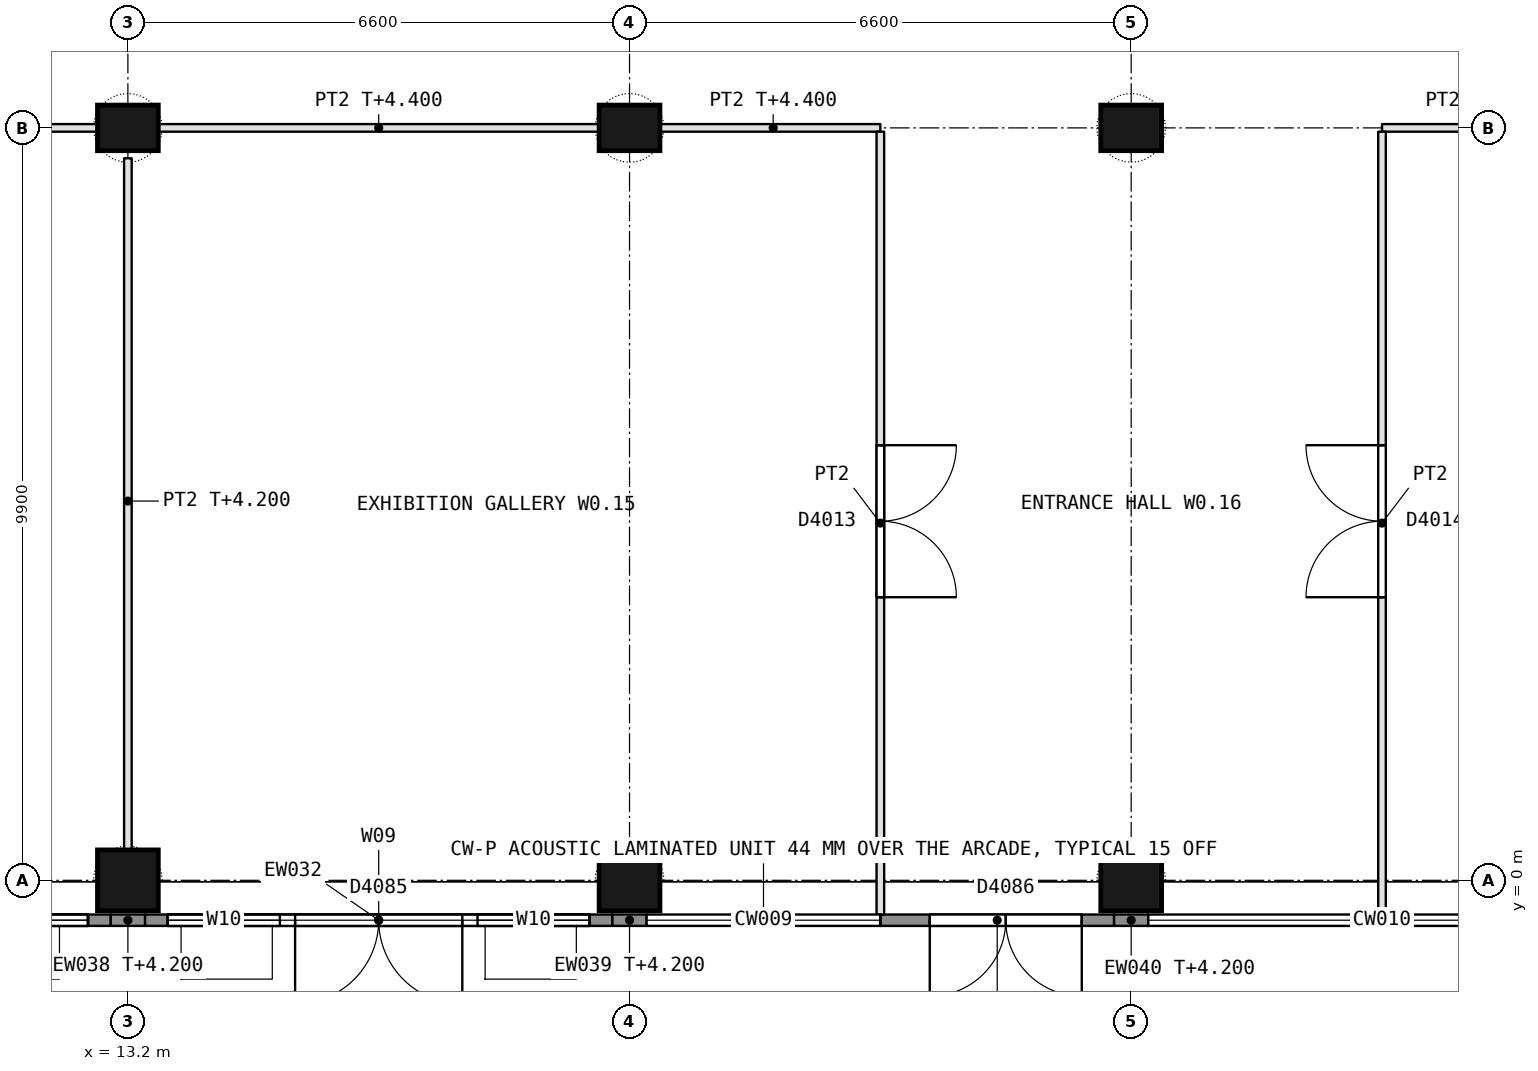
"""IFC4 building model, lengths in metres.
Left out: names, types, materials, properties, quantities, classifications, styles, units other than length and angle.
Written with IfcOpenShell. Run it as: python <this file> out.ifc"""

import sys

from ifc_helpers import new_model, si_unit, direction, frame, frame_2d, origin, origin_2d, place, context, subcontext, project, spatial, rectangle, extrude, element, fill, save


model = new_model("IFC4")
c1 = context("Model", 3, precision=1e-05, world=origin(), true_north=direction((0.0, 1.0)))
c2 = subcontext(c1, "Body", "Model", "MODEL_VIEW")
j1 = project(units=[si_unit("LENGTHUNIT", "METRE"), si_unit("PLANEANGLEUNIT", "RADIAN")], contexts=[c1])
p1 = place(None, origin())
s1 = spatial("IfcSite", under=j1, at=p1, CompositionType="ELEMENT")
p2 = place(p1, origin())
s2 = spatial("IfcBuilding", under=s1, at=p2, CompositionType="ELEMENT")
p3 = place(p2, origin())
s3 = spatial("IfcBuildingStorey", under=s2, at=p3, CompositionType="ELEMENT", Elevation=0.0)
p4 = place(p3, frame((13.2, 0.0, 0.0), z_axis=(0.0, 0.0, 1.0), x_axis=(1.0, 0.0, 0.0)))
e1 = element("IfcColumn", 1, at=p4, inside=s3, PredefinedType="COLUMN", context=c2, shape_type="SweptSolid", body=[
    extrude(rectangle(XDim=0.8, YDim=0.8, at=origin_2d()), origin(), (0.0, 0.0, 1.0), 5.4),
])
p5 = place(p3, frame((13.2, 9.9, 0.0), z_axis=(0.0, 0.0, 1.0), x_axis=(1.0, 0.0, 0.0)))
e2 = element("IfcColumn", 2, at=p5, inside=s3, PredefinedType="COLUMN", context=c2, shape_type="SweptSolid", body=[
    extrude(rectangle(XDim=0.8, YDim=0.6, at=origin_2d()), origin(), (0.0, 0.0, 1.0), 5.4),
])
p6 = place(p3, frame((19.8, 0.0, 0.0), z_axis=(0.0, 0.0, 1.0), x_axis=(1.0, 0.0, 0.0)))
e3 = element("IfcColumn", 3, at=p6, inside=s3, PredefinedType="COLUMN", context=c2, shape_type="SweptSolid", body=[
    extrude(rectangle(XDim=0.8, YDim=0.8, at=origin_2d()), origin(), (0.0, 0.0, 1.0), 5.4),
])
p7 = place(p3, frame((19.8, 9.9, 0.0), z_axis=(0.0, 0.0, 1.0), x_axis=(1.0, 0.0, 0.0)))
e4 = element("IfcColumn", 4, at=p7, inside=s3, PredefinedType="COLUMN", context=c2, shape_type="SweptSolid", body=[
    extrude(rectangle(XDim=0.8, YDim=0.6, at=origin_2d()), origin(), (0.0, 0.0, 1.0), 5.4),
])
p8 = place(p3, frame((26.4, 0.0, 0.0), z_axis=(0.0, 0.0, 1.0), x_axis=(1.0, 0.0, 0.0)))
e5 = element("IfcColumn", 5, at=p8, inside=s3, PredefinedType="COLUMN", context=c2, shape_type="SweptSolid", body=[
    extrude(rectangle(XDim=0.8, YDim=0.8, at=origin_2d()), origin(), (0.0, 0.0, 1.0), 5.4),
])
p9 = place(p3, frame((26.4, 9.9, 0.0), z_axis=(0.0, 0.0, 1.0), x_axis=(1.0, 0.0, 0.0)))
e6 = element("IfcColumn", 6, at=p9, inside=s3, PredefinedType="COLUMN", context=c2, shape_type="SweptSolid", body=[
    extrude(rectangle(XDim=0.8, YDim=0.6, at=origin_2d()), origin(), (0.0, 0.0, 1.0), 5.4),
])
p10 = place(p3, frame((12.975, -0.525, 0.0), z_axis=(0.0, 0.0, 1.0), x_axis=(-1.0, 0.0, 0.0)))
e7 = element("IfcWall", 7, at=p10, inside=s3, PredefinedType="STANDARD", context=c2, shape_type="SweptSolid", body=[
    extrude(rectangle(XDim=6.15, YDim=0.15, at=frame_2d((3.075, 0.0))), origin(), (0.0, 0.0, 1.0), 5.1),
])
p11 = place(p10, frame((2.175, 0.0, 0.0)))
e8 = element("IfcOpeningElement", 8, at=p11, cuts=e7, PredefinedType="OPENING", context=c2, shape_type="SweptSolid", body=[
    extrude(rectangle(XDim=1.8, YDim=2.4, at=frame_2d((0.9, 1.2))), frame((0.0, 0.085, 0.0), z_axis=(0.0, -1.0, 0.0), x_axis=(1.0, 0.0, 0.0)), (0.0, 0.0, 1.0), 0.17),
])
p12 = place(p10, frame((4.175, 0.0, 0.1)))
e9 = element("IfcOpeningElement", 9, at=p12, cuts=e7, PredefinedType="OPENING", context=c2, shape_type="SweptSolid", body=[
    extrude(rectangle(XDim=1.675, YDim=2.3, at=frame_2d((0.837, 1.15))), frame((0.0, 0.085, 0.0), z_axis=(0.0, -1.0, 0.0), x_axis=(1.0, 0.0, 0.0)), (0.0, 0.0, 1.0), 0.17),
])
p13 = place(p10, frame((0.3, 0.0, 0.1)))
e10 = element("IfcOpeningElement", 10, at=p13, cuts=e7, PredefinedType="OPENING", context=c2, shape_type="SweptSolid", body=[
    extrude(rectangle(XDim=1.675, YDim=2.3, at=frame_2d((0.837, 1.15))), frame((0.0, 0.085, 0.0), z_axis=(0.0, -1.0, 0.0), x_axis=(1.0, 0.0, 0.0)), (0.0, 0.0, 1.0), 0.17),
])
p14 = place(p10, frame((0.3, 0.0, 2.55)))
e11 = element("IfcOpeningElement", 11, at=p14, cuts=e7, PredefinedType="OPENING", context=c2, shape_type="SweptSolid", body=[
    extrude(rectangle(XDim=5.55, YDim=2.4, at=frame_2d((2.775, 1.2))), frame((0.0, 0.085, 0.0), z_axis=(0.0, -1.0, 0.0), x_axis=(1.0, 0.0, 0.0)), (0.0, 0.0, 1.0), 0.17),
])
p15 = place(p3, frame((19.575, -0.525, 0.0), z_axis=(0.0, 0.0, 1.0), x_axis=(-1.0, 0.0, 0.0)))
e12 = element("IfcWall", 12, at=p15, inside=s3, PredefinedType="STANDARD", context=c2, shape_type="SweptSolid", body=[
    extrude(rectangle(XDim=6.15, YDim=0.15, at=frame_2d((3.075, 0.0))), origin(), (0.0, 0.0, 1.0), 5.1),
])
p16 = place(p15, frame((1.975, 0.0, 0.0)))
e13 = element("IfcOpeningElement", 13, at=p16, cuts=e12, PredefinedType="OPENING", context=c2, shape_type="SweptSolid", body=[
    extrude(rectangle(XDim=2.2, YDim=2.4, at=frame_2d((1.1, 1.2))), frame((0.0, 0.085, 0.0), z_axis=(0.0, -1.0, 0.0), x_axis=(1.0, 0.0, 0.0)), (0.0, 0.0, 1.0), 0.17),
])
p17 = place(p15, frame((4.375, 0.0, 0.1)))
e14 = element("IfcOpeningElement", 14, at=p17, cuts=e12, PredefinedType="OPENING", context=c2, shape_type="SweptSolid", body=[
    extrude(rectangle(XDim=1.475, YDim=2.3, at=frame_2d((0.738, 1.15))), frame((0.0, 0.085, 0.0), z_axis=(0.0, -1.0, 0.0), x_axis=(1.0, 0.0, 0.0)), (0.0, 0.0, 1.0), 0.17),
])
p18 = place(p15, frame((0.3, 0.0, 0.1)))
e15 = element("IfcOpeningElement", 15, at=p18, cuts=e12, PredefinedType="OPENING", context=c2, shape_type="SweptSolid", body=[
    extrude(rectangle(XDim=1.475, YDim=2.3, at=frame_2d((0.738, 1.15))), frame((0.0, 0.085, 0.0), z_axis=(0.0, -1.0, 0.0), x_axis=(1.0, 0.0, 0.0)), (0.0, 0.0, 1.0), 0.17),
])
p19 = place(p15, frame((0.3, 0.0, 2.55)))
e16 = element("IfcOpeningElement", 16, at=p19, cuts=e12, PredefinedType="OPENING", context=c2, shape_type="SweptSolid", body=[
    extrude(rectangle(XDim=5.55, YDim=2.4, at=frame_2d((2.775, 1.2))), frame((0.0, 0.085, 0.0), z_axis=(0.0, -1.0, 0.0), x_axis=(1.0, 0.0, 0.0)), (0.0, 0.0, 1.0), 0.17),
])
p20 = place(p3, frame((26.175, -0.525, 0.0), z_axis=(0.0, 0.0, 1.0), x_axis=(-1.0, 0.0, 0.0)))
e17 = element("IfcWall", 17, at=p20, inside=s3, PredefinedType="STANDARD", context=c2, shape_type="SweptSolid", body=[
    extrude(rectangle(XDim=3.075, YDim=0.15, at=frame_2d((1.538, 0.0))), origin(), (0.0, 0.0, 1.0), 5.1),
])
p21 = place(p20, frame((0.425, 0.0, 0.0)))
e18 = element("IfcOpeningElement", 18, at=p21, cuts=e17, PredefinedType="OPENING", context=c2, shape_type="SweptSolid", body=[
    extrude(rectangle(XDim=2.0, YDim=2.4, at=frame_2d((1.0, 1.2))), frame((0.0, 0.085, 0.0), z_axis=(0.0, -1.0, 0.0), x_axis=(1.0, 0.0, 0.0)), (0.0, 0.0, 1.0), 0.17),
])
for number, where, z_axis, x_axis in (
    (19, (13.425, -0.525, 0.0), (0.0, 0.0, 1.0), (-1.0, 0.0, 0.0)),
    (20, (20.025, -0.525, 0.0), (0.0, 0.0, 1.0), (-1.0, 0.0, 0.0)),
    (21, (26.625, -0.525, 0.0), (0.0, 0.0, 1.0), (-1.0, 0.0, 0.0)),
):
    element("IfcWall", number, at=place(p3, frame(where, z_axis=z_axis, x_axis=x_axis)), inside=s3, PredefinedType="STANDARD", context=c2, shape_type="SweptSolid", body=[
        extrude(rectangle(XDim=0.45, YDim=0.15, at=frame_2d((0.225, 0.0))), origin(), (0.0, 0.0, 1.0), 4.2),
    ])
p22 = place(p3, frame((7.0, 9.9, 0.0), z_axis=(0.0, 0.0, 1.0), x_axis=(1.0, 0.0, 0.0)))
e22 = element("IfcWall", 22, at=p22, inside=s3, PredefinedType="PARTITIONING", context=c2, shape_type="SweptSolid", body=[
    extrude(rectangle(XDim=5.8, YDim=0.1, at=frame_2d((2.9, 0.0))), origin(), (0.0, 0.0, 1.0), 4.4),
])
p23 = place(p3, frame((13.6, 9.9, 0.0), z_axis=(0.0, 0.0, 1.0), x_axis=(1.0, 0.0, 0.0)))
e23 = element("IfcWall", 23, at=p23, inside=s3, PredefinedType="PARTITIONING", context=c2, shape_type="SweptSolid", body=[
    extrude(rectangle(XDim=5.8, YDim=0.1, at=frame_2d((2.9, 0.0))), origin(), (0.0, 0.0, 1.0), 4.4),
])
for number, where, z_axis, x_axis in (
    (24, (20.2, 9.9, 0.0), (0.0, 0.0, 1.0), (1.0, 0.0, 0.0)),
    (25, (29.7, 9.9, 0.0), (0.0, 0.0, 1.0), (1.0, 0.0, 0.0)),
):
    element("IfcWall", number, at=place(p3, frame(where, z_axis=z_axis, x_axis=x_axis)), inside=s3, PredefinedType="PARTITIONING", context=c2, shape_type="SweptSolid", body=[
        extrude(rectangle(XDim=2.9, YDim=0.1, at=frame_2d((1.45, 0.0))), origin(), (0.0, 0.0, 1.0), 4.4),
    ])
p24 = place(p3, frame((13.2, 0.4, 0.0), z_axis=(0.0, 0.0, 1.0), x_axis=(0.0, 1.0, 0.0)))
e26 = element("IfcWall", 26, at=p24, inside=s3, PredefinedType="PARTITIONING", context=c2, shape_type="SweptSolid", body=[
    extrude(rectangle(XDim=9.1, YDim=0.1, at=frame_2d((4.55, 0.0))), origin(), (0.0, 0.0, 1.0), 4.2),
])
p25 = place(p3, frame((23.1, 9.85, 0.0), z_axis=(0.0, 0.0, 1.0), x_axis=(0.0, -1.0, 0.0)))
e27 = element("IfcWall", 27, at=p25, inside=s3, PredefinedType="PARTITIONING", context=c2, shape_type="SweptSolid", body=[
    extrude(rectangle(XDim=10.3, YDim=0.1, at=frame_2d((5.15, 0.0))), origin(), (0.0, 0.0, 1.0), 5.1),
])
p26 = place(p25, frame((4.125, 0.0, 0.0)))
e28 = element("IfcOpeningElement", 28, at=p26, cuts=e27, PredefinedType="OPENING", context=c2, shape_type="SweptSolid", body=[
    extrude(rectangle(XDim=2.0, YDim=2.4, at=frame_2d((1.0, 1.2))), frame((0.0, 0.06, 0.0), z_axis=(0.0, -1.0, 0.0), x_axis=(1.0, 0.0, 0.0)), (0.0, 0.0, 1.0), 0.12),
])
p27 = place(p3, frame((29.7, -0.45, 0.0), z_axis=(0.0, 0.0, 1.0), x_axis=(0.0, 1.0, 0.0)))
e29 = element("IfcWall", 29, at=p27, inside=s3, PredefinedType="PARTITIONING", context=c2, shape_type="SweptSolid", body=[
    extrude(rectangle(XDim=10.3, YDim=0.1, at=frame_2d((5.15, 0.0))), origin(), (0.0, 0.0, 1.0), 5.1),
])
p28 = place(p27, frame((4.175, 0.0, 0.0)))
e30 = element("IfcOpeningElement", 30, at=p28, cuts=e29, PredefinedType="OPENING", context=c2, shape_type="SweptSolid", body=[
    extrude(rectangle(XDim=2.0, YDim=2.4, at=frame_2d((1.0, 1.2))), frame((0.0, 0.06, 0.0), z_axis=(0.0, -1.0, 0.0), x_axis=(1.0, 0.0, 0.0)), (0.0, 0.0, 1.0), 0.12),
])
p29 = place(p13, origin())
e31 = element("IfcWindow", 31, at=p29, inside=s3, PartitioningType="SINGLE_PANEL", PredefinedType="WINDOW", context=c2, shape_type="SweptSolid", body=[
    extrude(rectangle(XDim=1.675, YDim=2.3, at=frame_2d((0.837, 1.15))), frame((0.0, 0.03, 0.0), z_axis=(0.0, -1.0, 0.0), x_axis=(1.0, 0.0, 0.0)), (0.0, 0.0, 1.0), 0.06),
])
fill(e10, e31)
p30 = place(p14, origin())
e32 = element("IfcWindow", 32, at=p30, inside=s3, PartitioningType="SINGLE_PANEL", PredefinedType="WINDOW", context=c2, shape_type="SweptSolid", body=[
    extrude(rectangle(XDim=5.55, YDim=2.4, at=frame_2d((2.775, 1.2))), frame((0.0, 0.03, 0.0), z_axis=(0.0, -1.0, 0.0), x_axis=(1.0, 0.0, 0.0)), (0.0, 0.0, 1.0), 0.06),
])
fill(e11, e32)
p31 = place(p16, origin())
e33 = element("IfcDoor", 33, at=p31, inside=s3, OperationType="DOUBLE_DOOR_SINGLE_SWING", PredefinedType="DOOR", context=c2, shape_type="SweptSolid", body=[
    extrude(rectangle(XDim=2.2, YDim=2.4, at=frame_2d((1.1, 1.2))), frame((0.0, 0.025, 0.0), z_axis=(0.0, -1.0, 0.0), x_axis=(1.0, 0.0, 0.0)), (0.0, 0.0, 1.0), 0.05),
])
fill(e13, e33)
p32 = place(p17, origin())
e34 = element("IfcWindow", 34, at=p32, inside=s3, PartitioningType="SINGLE_PANEL", PredefinedType="WINDOW", context=c2, shape_type="SweptSolid", body=[
    extrude(rectangle(XDim=1.475, YDim=2.3, at=frame_2d((0.738, 1.15))), frame((0.0, 0.03, 0.0), z_axis=(0.0, -1.0, 0.0), x_axis=(1.0, 0.0, 0.0)), (0.0, 0.0, 1.0), 0.06),
])
fill(e14, e34)
p33 = place(p18, origin())
e35 = element("IfcWindow", 35, at=p33, inside=s3, PartitioningType="SINGLE_PANEL", PredefinedType="WINDOW", context=c2, shape_type="SweptSolid", body=[
    extrude(rectangle(XDim=1.475, YDim=2.3, at=frame_2d((0.738, 1.15))), frame((0.0, 0.03, 0.0), z_axis=(0.0, -1.0, 0.0), x_axis=(1.0, 0.0, 0.0)), (0.0, 0.0, 1.0), 0.06),
])
fill(e15, e35)
p34 = place(p19, origin())
e36 = element("IfcWindow", 36, at=p34, inside=s3, PartitioningType="SINGLE_PANEL", PredefinedType="WINDOW", context=c2, shape_type="SweptSolid", body=[
    extrude(rectangle(XDim=5.55, YDim=2.4, at=frame_2d((2.775, 1.2))), frame((0.0, 0.03, 0.0), z_axis=(0.0, -1.0, 0.0), x_axis=(1.0, 0.0, 0.0)), (0.0, 0.0, 1.0), 0.06),
])
fill(e16, e36)
p35 = place(p21, origin())
e37 = element("IfcDoor", 37, at=p35, inside=s3, OperationType="DOUBLE_DOOR_SINGLE_SWING", PredefinedType="DOOR", context=c2, shape_type="SweptSolid", body=[
    extrude(rectangle(XDim=2.0, YDim=2.4, at=frame_2d((1.0, 1.2))), frame((0.0, 0.025, 0.0), z_axis=(0.0, -1.0, 0.0), x_axis=(1.0, 0.0, 0.0)), (0.0, 0.0, 1.0), 0.05),
])
fill(e18, e37)
p36 = place(p26, origin())
e38 = element("IfcDoor", 38, at=p36, inside=s3, OperationType="DOUBLE_DOOR_SINGLE_SWING", PredefinedType="DOOR", context=c2, shape_type="SweptSolid", body=[
    extrude(rectangle(XDim=2.0, YDim=2.4, at=frame_2d((1.0, 1.2))), frame((0.0, 0.025, 0.0), z_axis=(0.0, -1.0, 0.0), x_axis=(1.0, 0.0, 0.0)), (0.0, 0.0, 1.0), 0.05),
])
fill(e28, e38)
p37 = place(p28, origin())
e39 = element("IfcDoor", 39, at=p37, inside=s3, OperationType="DOUBLE_DOOR_SINGLE_SWING", PredefinedType="DOOR", context=c2, shape_type="SweptSolid", body=[
    extrude(rectangle(XDim=2.0, YDim=2.4, at=frame_2d((1.0, 1.2))), frame((0.0, 0.025, 0.0), z_axis=(0.0, -1.0, 0.0), x_axis=(1.0, 0.0, 0.0)), (0.0, 0.0, 1.0), 0.05),
])
fill(e30, e39)
save(model, sys.argv[1])
